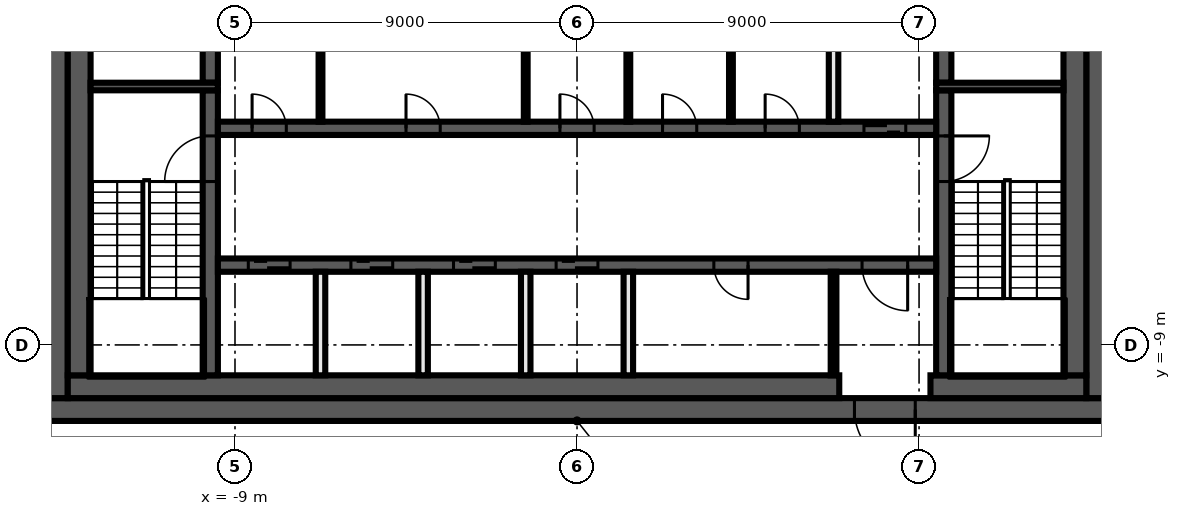
"""IFC4 building model, lengths in metres.
Left out: names, types, materials, properties, quantities, classifications, styles, units other than length and angle.
Written with IfcOpenShell. Run it as: python <this file> out.ifc"""

import sys

from ifc_helpers import new_model, si_unit, direction, frame, frame_2d, origin, place, context, subcontext, project, spatial, rectangle, extrude, element, fill, save


model = new_model("IFC4")
c1 = context("Model", 3, precision=1e-05, world=origin(), true_north=direction((0.0, 1.0)))
c2 = subcontext(c1, "Body", "Model", "MODEL_VIEW")
j1 = project(units=[si_unit("LENGTHUNIT", "METRE"), si_unit("PLANEANGLEUNIT", "RADIAN")], contexts=[c1])
p1 = place(None, origin())
s1 = spatial("IfcSite", under=j1, at=p1, CompositionType="ELEMENT")
p2 = place(p1, origin())
s2 = spatial("IfcBuilding", under=s1, at=p2, CompositionType="ELEMENT")
p3 = place(p2, frame((0.0, 0.0, 302.6)))
s3 = spatial("IfcBuildingStorey", under=s2, at=p3, CompositionType="ELEMENT", Elevation=302.6)
p4 = place(p3, frame((14.0, -10.7, 0.0), z_axis=(0.0, 0.0, 1.0), x_axis=(-1.0, 0.0, 0.0)))
e1 = element("IfcWall", 1, at=p4, inside=s3, PredefinedType="SHEAR", context=c2, shape_type="SweptSolid", body=[
    extrude(rectangle(XDim=28.0, YDim=0.6, at=frame_2d((14.0, 0.0))), origin(), (0.0, 0.0, 1.0), 3.82),
])
p5 = place(p4, frame((5.1, 0.0, 0.0)))
e2 = element("IfcOpeningElement", 2, at=p5, cuts=e1, PredefinedType="OPENING", context=c2, shape_type="SweptSolid", body=[
    extrude(rectangle(XDim=1.6, YDim=2.1, at=frame_2d((0.8, 1.05))), frame((0.0, 0.31, 0.0), z_axis=(0.0, -1.0, 0.0), x_axis=(1.0, 0.0, 0.0)), (0.0, 0.0, 1.0), 0.62),
])
for number, where, z_axis, x_axis in (
    (3, (13.7, 10.4, 0.0), (0.0, 0.0, 1.0), (0.0, -1.0, 0.0)),
    (4, (-13.7, -10.4, 0.0), (0.0, 0.0, 1.0), (0.0, 1.0, 0.0)),
):
    element("IfcWall", number, at=place(p3, frame(where, z_axis=z_axis, x_axis=x_axis)), inside=s3, PredefinedType="SHEAR", context=c2, shape_type="SweptSolid", body=[
        extrude(rectangle(XDim=20.8, YDim=0.6, at=frame_2d((10.4, 0.0))), origin(), (0.0, 0.0, 1.0), 3.82),
    ])
p6 = place(p3, frame((13.4, -10.1, 0.0), z_axis=(0.0, 0.0, 1.0), x_axis=(-1.0, 0.0, 0.0)))
e5 = element("IfcWall", 5, at=p6, inside=s3, PredefinedType="SHEAR", context=c2, shape_type="SweptSolid", body=[
    extrude(rectangle(XDim=4.1, YDim=0.6, at=frame_2d((2.05, 0.0))), origin(), (0.0, 0.0, 1.0), 3.82),
])
p7 = place(p3, frame((6.9, -10.1, 0.0), z_axis=(0.0, 0.0, 1.0), x_axis=(-1.0, 0.0, 0.0)))
e6 = element("IfcWall", 6, at=p7, inside=s3, PredefinedType="SHEAR", context=c2, shape_type="SweptSolid", body=[
    extrude(rectangle(XDim=20.3, YDim=0.6, at=frame_2d((10.15, 0.0))), origin(), (0.0, 0.0, 1.0), 3.82),
])
for number, where, z_axis, x_axis in (
    (7, (13.1, 9.8, 0.0), (0.0, 0.0, 1.0), (0.0, -1.0, 0.0)),
    (8, (-13.1, -9.8, 0.0), (0.0, 0.0, 1.0), (0.0, 1.0, 0.0)),
):
    element("IfcWall", number, at=place(p3, frame(where, z_axis=z_axis, x_axis=x_axis)), inside=s3, PredefinedType="SHEAR", context=c2, shape_type="SweptSolid", body=[
        extrude(rectangle(XDim=19.6, YDim=0.6, at=frame_2d((9.8, 0.0))), origin(), (0.0, 0.0, 1.0), 3.82),
    ])
p8 = place(p3, frame((9.65, -2.3, 0.0), z_axis=(0.0, 0.0, 1.0), x_axis=(0.0, -1.0, 0.0)))
e9 = element("IfcWall", 9, at=p8, inside=s3, PredefinedType="SHEAR", context=c2, shape_type="SweptSolid", body=[
    extrude(rectangle(XDim=7.5, YDim=0.4, at=frame_2d((3.75, 0.0))), origin(), (0.0, 0.0, 1.0), 3.82),
])
p9 = place(p8, frame((1.2, 0.0, 0.0)))
e10 = element("IfcOpeningElement", 10, at=p9, cuts=e9, PredefinedType="OPENING", context=c2, shape_type="SweptSolid", body=[
    extrude(rectangle(XDim=1.2, YDim=2.1, at=frame_2d((0.6, 1.05))), frame((0.0, 0.21, 0.0), z_axis=(0.0, -1.0, 0.0), x_axis=(1.0, 0.0, 0.0)), (0.0, 0.0, 1.0), 0.42),
])
p10 = place(p3, frame((9.65, 2.1, 0.0), z_axis=(0.0, 0.0, 1.0), x_axis=(0.0, -1.0, 0.0)))
e11 = element("IfcWall", 11, at=p10, inside=s3, PredefinedType="SHEAR", context=c2, shape_type="SweptSolid", body=[
    extrude(rectangle(XDim=4.2, YDim=0.4, at=frame_2d((2.1, 0.0))), origin(), (0.0, 0.0, 1.0), 3.82),
])
p11 = place(p10, frame((0.15, 0.0, 0.0)))
e12 = element("IfcOpeningElement", 12, at=p11, cuts=e11, PredefinedType="OPENING", context=c2, shape_type="SweptSolid", body=[
    extrude(rectangle(XDim=0.9, YDim=2.1, at=frame_2d((0.45, 1.05))), frame((0.0, 0.21, 0.0), z_axis=(0.0, -1.0, 0.0), x_axis=(1.0, 0.0, 0.0)), (0.0, 0.0, 1.0), 0.42),
])
p12 = place(p3, frame((-9.65, -9.8, 0.0), z_axis=(0.0, 0.0, 1.0), x_axis=(0.0, 1.0, 0.0)))
e13 = element("IfcWall", 13, at=p12, inside=s3, PredefinedType="SHEAR", context=c2, shape_type="SweptSolid", body=[
    extrude(rectangle(XDim=7.5, YDim=0.4, at=frame_2d((3.75, 0.0))), origin(), (0.0, 0.0, 1.0), 3.82),
])
p13 = place(p12, frame((5.1, 0.0, 0.0)))
e14 = element("IfcOpeningElement", 14, at=p13, cuts=e13, PredefinedType="OPENING", context=c2, shape_type="SweptSolid", body=[
    extrude(rectangle(XDim=1.2, YDim=2.1, at=frame_2d((0.6, 1.05))), frame((0.0, 0.21, 0.0), z_axis=(0.0, -1.0, 0.0), x_axis=(1.0, 0.0, 0.0)), (0.0, 0.0, 1.0), 0.42),
])
p14 = place(p3, frame((-9.65, -2.1, 0.0), z_axis=(0.0, 0.0, 1.0), x_axis=(0.0, 1.0, 0.0)))
e15 = element("IfcWall", 15, at=p14, inside=s3, PredefinedType="SHEAR", context=c2, shape_type="SweptSolid", body=[
    extrude(rectangle(XDim=4.2, YDim=0.4, at=frame_2d((2.1, 0.0))), origin(), (0.0, 0.0, 1.0), 3.82),
])
for number, where, z_axis, x_axis in (
    (16, (9.45, -2.2, 0.0), (0.0, 0.0, 1.0), (1.0, 0.0, 0.0)),
    (17, (-9.45, -2.2, 0.0), (0.0, 0.0, 1.0), (-1.0, 0.0, 0.0)),
):
    element("IfcWall", number, at=place(p3, frame(where, z_axis=z_axis, x_axis=x_axis)), inside=s3, PredefinedType="SHEAR", context=c2, shape_type="SweptSolid", body=[
        extrude(rectangle(XDim=3.35, YDim=0.2, at=frame_2d((1.675, 0.0))), origin(), (0.0, 0.0, 1.0), 3.82),
    ])
p15 = place(p3, frame((-9.45, -3.3, 0.0), z_axis=(0.0, 0.0, 1.0), x_axis=(1.0, 0.0, 0.0)))
e18 = element("IfcWall", 18, at=p15, inside=s3, PredefinedType="SHEAR", context=c2, shape_type="SweptSolid", body=[
    extrude(rectangle(XDim=18.9, YDim=0.35, at=frame_2d((9.45, 0.0))), origin(), (0.0, 0.0, 1.0), 3.82),
])
p16 = place(p15, frame((17.0, 0.0, 0.0)))
e19 = element("IfcOpeningElement", 19, at=p16, cuts=e18, PredefinedType="OPENING", context=c2, shape_type="SweptSolid", body=[
    extrude(rectangle(XDim=1.1, YDim=2.1, at=frame_2d((0.55, 1.05))), frame((0.0, 0.185, 0.0), z_axis=(0.0, -1.0, 0.0), x_axis=(1.0, 0.0, 0.0)), (0.0, 0.0, 1.0), 0.37),
])
p17 = place(p15, frame((0.9, 0.0, 0.0)))
e20 = element("IfcOpeningElement", 20, at=p17, cuts=e18, PredefinedType="OPENING", context=c2, shape_type="SweptSolid", body=[
    extrude(rectangle(XDim=0.9, YDim=2.1, at=frame_2d((0.45, 1.05))), frame((0.0, 0.185, 0.0), z_axis=(0.0, -1.0, 0.0), x_axis=(1.0, 0.0, 0.0)), (0.0, 0.0, 1.0), 0.37),
])
p18 = place(p15, frame((4.95, 0.0, 0.0)))
e21 = element("IfcOpeningElement", 21, at=p18, cuts=e18, PredefinedType="OPENING", context=c2, shape_type="SweptSolid", body=[
    extrude(rectangle(XDim=0.9, YDim=2.1, at=frame_2d((0.45, 1.05))), frame((0.0, 0.185, 0.0), z_axis=(0.0, -1.0, 0.0), x_axis=(1.0, 0.0, 0.0)), (0.0, 0.0, 1.0), 0.37),
])
p19 = place(p15, frame((9.0, 0.0, 0.0)))
e22 = element("IfcOpeningElement", 22, at=p19, cuts=e18, PredefinedType="OPENING", context=c2, shape_type="SweptSolid", body=[
    extrude(rectangle(XDim=0.9, YDim=2.1, at=frame_2d((0.45, 1.05))), frame((0.0, 0.185, 0.0), z_axis=(0.0, -1.0, 0.0), x_axis=(1.0, 0.0, 0.0)), (0.0, 0.0, 1.0), 0.37),
])
p20 = place(p15, frame((11.7, 0.0, 0.0)))
e23 = element("IfcOpeningElement", 23, at=p20, cuts=e18, PredefinedType="OPENING", context=c2, shape_type="SweptSolid", body=[
    extrude(rectangle(XDim=0.9, YDim=2.1, at=frame_2d((0.45, 1.05))), frame((0.0, 0.185, 0.0), z_axis=(0.0, -1.0, 0.0), x_axis=(1.0, 0.0, 0.0)), (0.0, 0.0, 1.0), 0.37),
])
p21 = place(p15, frame((14.4, 0.0, 0.0)))
e24 = element("IfcOpeningElement", 24, at=p21, cuts=e18, PredefinedType="OPENING", context=c2, shape_type="SweptSolid", body=[
    extrude(rectangle(XDim=0.9, YDim=2.1, at=frame_2d((0.45, 1.05))), frame((0.0, 0.185, 0.0), z_axis=(0.0, -1.0, 0.0), x_axis=(1.0, 0.0, 0.0)), (0.0, 0.0, 1.0), 0.37),
])
p22 = place(p3, frame((9.45, -6.9, 0.0), z_axis=(0.0, 0.0, 1.0), x_axis=(-1.0, 0.0, 0.0)))
e25 = element("IfcWall", 25, at=p22, inside=s3, PredefinedType="SHEAR", context=c2, shape_type="SweptSolid", body=[
    extrude(rectangle(XDim=18.9, YDim=0.35, at=frame_2d((9.45, 0.0))), origin(), (0.0, 0.0, 1.0), 3.82),
])
p23 = place(p22, frame((17.0, 0.0, 0.0)))
e26 = element("IfcOpeningElement", 26, at=p23, cuts=e25, PredefinedType="OPENING", context=c2, shape_type="SweptSolid", body=[
    extrude(rectangle(XDim=1.1, YDim=2.1, at=frame_2d((0.55, 1.05))), frame((0.0, 0.185, 0.0), z_axis=(0.0, -1.0, 0.0), x_axis=(1.0, 0.0, 0.0)), (0.0, 0.0, 1.0), 0.37),
])
p24 = place(p22, frame((14.3, 0.0, 0.0)))
e27 = element("IfcOpeningElement", 27, at=p24, cuts=e25, PredefinedType="OPENING", context=c2, shape_type="SweptSolid", body=[
    extrude(rectangle(XDim=1.1, YDim=2.1, at=frame_2d((0.55, 1.05))), frame((0.0, 0.185, 0.0), z_axis=(0.0, -1.0, 0.0), x_axis=(1.0, 0.0, 0.0)), (0.0, 0.0, 1.0), 0.37),
])
p25 = place(p22, frame((11.6, 0.0, 0.0)))
e28 = element("IfcOpeningElement", 28, at=p25, cuts=e25, PredefinedType="OPENING", context=c2, shape_type="SweptSolid", body=[
    extrude(rectangle(XDim=1.1, YDim=2.1, at=frame_2d((0.55, 1.05))), frame((0.0, 0.185, 0.0), z_axis=(0.0, -1.0, 0.0), x_axis=(1.0, 0.0, 0.0)), (0.0, 0.0, 1.0), 0.37),
])
p26 = place(p22, frame((8.9, 0.0, 0.0)))
e29 = element("IfcOpeningElement", 29, at=p26, cuts=e25, PredefinedType="OPENING", context=c2, shape_type="SweptSolid", body=[
    extrude(rectangle(XDim=1.1, YDim=2.1, at=frame_2d((0.55, 1.05))), frame((0.0, 0.185, 0.0), z_axis=(0.0, -1.0, 0.0), x_axis=(1.0, 0.0, 0.0)), (0.0, 0.0, 1.0), 0.37),
])
p27 = place(p22, frame((0.75, 0.0, 0.0)))
e30 = element("IfcOpeningElement", 30, at=p27, cuts=e25, PredefinedType="OPENING", context=c2, shape_type="SweptSolid", body=[
    extrude(rectangle(XDim=1.2, YDim=2.1, at=frame_2d((0.6, 1.05))), frame((0.0, 0.185, 0.0), z_axis=(0.0, -1.0, 0.0), x_axis=(1.0, 0.0, 0.0)), (0.0, 0.0, 1.0), 0.37),
])
p28 = place(p22, frame((4.95, 0.0, 0.0)))
e31 = element("IfcOpeningElement", 31, at=p28, cuts=e25, PredefinedType="OPENING", context=c2, shape_type="SweptSolid", body=[
    extrude(rectangle(XDim=0.9, YDim=2.1, at=frame_2d((0.45, 1.05))), frame((0.0, 0.185, 0.0), z_axis=(0.0, -1.0, 0.0), x_axis=(1.0, 0.0, 0.0)), (0.0, 0.0, 1.0), 0.37),
])
p29 = place(p3, frame((6.75, -9.8, 0.0), z_axis=(0.0, 0.0, 1.0), x_axis=(0.0, 1.0, 0.0)))
e32 = element("IfcWall", 32, at=p29, inside=s3, PredefinedType="PARTITIONING", context=c2, shape_type="SweptSolid", body=[
    extrude(rectangle(XDim=2.725, YDim=0.15, at=frame_2d((1.363, 0.0))), origin(), (0.0, 0.0, 1.0), 3.82),
])
p30 = place(p3, frame((6.75, -3.125, 0.0), z_axis=(0.0, 0.0, 1.0), x_axis=(0.0, 1.0, 0.0)))
e33 = element("IfcWall", 33, at=p30, inside=s3, PredefinedType="SOLIDWALL", context=c2, shape_type="SweptSolid", body=[
    extrude(rectangle(XDim=2.725, YDim=0.25, at=frame_2d((1.363, 0.0))), origin(), (0.0, 0.0, 1.0), 3.82),
])
for number, where, z_axis, x_axis in (
    (34, (4.05, -3.125, 0.0), (0.0, 0.0, 1.0), (0.0, 1.0, 0.0)),
    (35, (1.35, -3.125, 0.0), (0.0, 0.0, 1.0), (0.0, 1.0, 0.0)),
):
    element("IfcWall", number, at=place(p3, frame(where, z_axis=z_axis, x_axis=x_axis)), inside=s3, PredefinedType="PARTITIONING", context=c2, shape_type="SweptSolid", body=[
        extrude(rectangle(XDim=2.725, YDim=0.1, at=frame_2d((1.363, 0.0))), origin(), (0.0, 0.0, 1.0), 3.82),
    ])
p31 = place(p3, frame((1.35, -9.8, 0.0), z_axis=(0.0, 0.0, 1.0), x_axis=(0.0, 1.0, 0.0)))
e36 = element("IfcWall", 36, at=p31, inside=s3, PredefinedType="SOLIDWALL", context=c2, shape_type="SweptSolid", body=[
    extrude(rectangle(XDim=2.725, YDim=0.25, at=frame_2d((1.363, 0.0))), origin(), (0.0, 0.0, 1.0), 3.82),
])
p32 = place(p3, frame((-1.35, -3.125, 0.0), z_axis=(0.0, 0.0, 1.0), x_axis=(0.0, 1.0, 0.0)))
e37 = element("IfcWall", 37, at=p32, inside=s3, PredefinedType="PARTITIONING", context=c2, shape_type="SweptSolid", body=[
    extrude(rectangle(XDim=2.725, YDim=0.1, at=frame_2d((1.363, 0.0))), origin(), (0.0, 0.0, 1.0), 3.82),
])
for number, where, z_axis, x_axis in (
    (38, (-1.35, -9.8, 0.0), (0.0, 0.0, 1.0), (0.0, 1.0, 0.0)),
    (39, (-4.05, -9.8, 0.0), (0.0, 0.0, 1.0), (0.0, 1.0, 0.0)),
):
    element("IfcWall", number, at=place(p3, frame(where, z_axis=z_axis, x_axis=x_axis)), inside=s3, PredefinedType="SOLIDWALL", context=c2, shape_type="SweptSolid", body=[
        extrude(rectangle(XDim=2.725, YDim=0.25, at=frame_2d((1.363, 0.0))), origin(), (0.0, 0.0, 1.0), 3.82),
    ])
p33 = place(p3, frame((-6.75, -3.125, 0.0), z_axis=(0.0, 0.0, 1.0), x_axis=(0.0, 1.0, 0.0)))
e40 = element("IfcWall", 40, at=p33, inside=s3, PredefinedType="PARTITIONING", context=c2, shape_type="SweptSolid", body=[
    extrude(rectangle(XDim=2.725, YDim=0.1, at=frame_2d((1.363, 0.0))), origin(), (0.0, 0.0, 1.0), 3.82),
])
p34 = place(p3, frame((-6.75, -9.8, 0.0), z_axis=(0.0, 0.0, 1.0), x_axis=(0.0, 1.0, 0.0)))
e41 = element("IfcWall", 41, at=p34, inside=s3, PredefinedType="SOLIDWALL", context=c2, shape_type="SweptSolid", body=[
    extrude(rectangle(XDim=2.725, YDim=0.25, at=frame_2d((1.363, 0.0))), origin(), (0.0, 0.0, 1.0), 3.82),
])
p35 = place(p16, origin())
e42 = element("IfcDoor", 42, at=p35, inside=s3, OperationType="DOUBLE_DOOR_SLIDING", PredefinedType="DOOR", context=c2, shape_type="SweptSolid", body=[
    extrude(rectangle(XDim=1.1, YDim=2.1, at=frame_2d((0.55, 1.05))), frame((0.0, 0.025, 0.0), z_axis=(0.0, -1.0, 0.0), x_axis=(1.0, 0.0, 0.0)), (0.0, 0.0, 1.0), 0.05),
])
fill(e19, e42)
p36 = place(p23, origin())
e43 = element("IfcDoor", 43, at=p36, inside=s3, OperationType="DOUBLE_DOOR_SLIDING", PredefinedType="DOOR", context=c2, shape_type="SweptSolid", body=[
    extrude(rectangle(XDim=1.1, YDim=2.1, at=frame_2d((0.55, 1.05))), frame((0.0, 0.025, 0.0), z_axis=(0.0, -1.0, 0.0), x_axis=(1.0, 0.0, 0.0)), (0.0, 0.0, 1.0), 0.05),
])
fill(e26, e43)
p37 = place(p24, origin())
e44 = element("IfcDoor", 44, at=p37, inside=s3, OperationType="DOUBLE_DOOR_SLIDING", PredefinedType="DOOR", context=c2, shape_type="SweptSolid", body=[
    extrude(rectangle(XDim=1.1, YDim=2.1, at=frame_2d((0.55, 1.05))), frame((0.0, 0.025, 0.0), z_axis=(0.0, -1.0, 0.0), x_axis=(1.0, 0.0, 0.0)), (0.0, 0.0, 1.0), 0.05),
])
fill(e27, e44)
p38 = place(p25, origin())
e45 = element("IfcDoor", 45, at=p38, inside=s3, OperationType="DOUBLE_DOOR_SLIDING", PredefinedType="DOOR", context=c2, shape_type="SweptSolid", body=[
    extrude(rectangle(XDim=1.1, YDim=2.1, at=frame_2d((0.55, 1.05))), frame((0.0, 0.025, 0.0), z_axis=(0.0, -1.0, 0.0), x_axis=(1.0, 0.0, 0.0)), (0.0, 0.0, 1.0), 0.05),
])
fill(e28, e45)
p39 = place(p26, origin())
e46 = element("IfcDoor", 46, at=p39, inside=s3, OperationType="DOUBLE_DOOR_SLIDING", PredefinedType="DOOR", context=c2, shape_type="SweptSolid", body=[
    extrude(rectangle(XDim=1.1, YDim=2.1, at=frame_2d((0.55, 1.05))), frame((0.0, 0.025, 0.0), z_axis=(0.0, -1.0, 0.0), x_axis=(1.0, 0.0, 0.0)), (0.0, 0.0, 1.0), 0.05),
])
fill(e29, e46)
p40 = place(p5, origin())
e47 = element("IfcDoor", 47, at=p40, inside=s3, OperationType="DOUBLE_DOOR_SINGLE_SWING", PredefinedType="DOOR", context=c2, shape_type="SweptSolid", body=[
    extrude(rectangle(XDim=1.6, YDim=2.1, at=frame_2d((0.8, 1.05))), frame((0.0, 0.025, 0.0), z_axis=(0.0, -1.0, 0.0), x_axis=(1.0, 0.0, 0.0)), (0.0, 0.0, 1.0), 0.05),
])
fill(e2, e47)
p41 = place(p27, origin())
e48 = element("IfcDoor", 48, at=p41, inside=s3, OperationType="SINGLE_SWING_LEFT", PredefinedType="DOOR", context=c2, shape_type="SweptSolid", body=[
    extrude(rectangle(XDim=1.2, YDim=2.1, at=frame_2d((0.6, 1.05))), frame((0.0, 0.025, 0.0), z_axis=(0.0, -1.0, 0.0), x_axis=(1.0, 0.0, 0.0)), (0.0, 0.0, 1.0), 0.05),
])
fill(e30, e48)
p42 = place(p17, origin())
e49 = element("IfcDoor", 49, at=p42, inside=s3, OperationType="SINGLE_SWING_LEFT", PredefinedType="DOOR", context=c2, shape_type="SweptSolid", body=[
    extrude(rectangle(XDim=0.9, YDim=2.1, at=frame_2d((0.45, 1.05))), frame((0.0, 0.025, 0.0), z_axis=(0.0, -1.0, 0.0), x_axis=(1.0, 0.0, 0.0)), (0.0, 0.0, 1.0), 0.05),
])
fill(e20, e49)
p43 = place(p18, origin())
e50 = element("IfcDoor", 50, at=p43, inside=s3, OperationType="SINGLE_SWING_RIGHT", PredefinedType="DOOR", context=c2, shape_type="SweptSolid", body=[
    extrude(rectangle(XDim=0.9, YDim=2.1, at=frame_2d((0.45, 1.05))), frame((0.0, 0.025, 0.0), z_axis=(0.0, -1.0, 0.0), x_axis=(1.0, 0.0, 0.0)), (0.0, 0.0, 1.0), 0.05),
])
fill(e21, e50)
p44 = place(p19, origin())
e51 = element("IfcDoor", 51, at=p44, inside=s3, OperationType="SINGLE_SWING_LEFT", PredefinedType="DOOR", context=c2, shape_type="SweptSolid", body=[
    extrude(rectangle(XDim=0.9, YDim=2.1, at=frame_2d((0.45, 1.05))), frame((0.0, 0.025, 0.0), z_axis=(0.0, -1.0, 0.0), x_axis=(1.0, 0.0, 0.0)), (0.0, 0.0, 1.0), 0.05),
])
fill(e22, e51)
p45 = place(p20, origin())
e52 = element("IfcDoor", 52, at=p45, inside=s3, OperationType="SINGLE_SWING_RIGHT", PredefinedType="DOOR", context=c2, shape_type="SweptSolid", body=[
    extrude(rectangle(XDim=0.9, YDim=2.1, at=frame_2d((0.45, 1.05))), frame((0.0, 0.025, 0.0), z_axis=(0.0, -1.0, 0.0), x_axis=(1.0, 0.0, 0.0)), (0.0, 0.0, 1.0), 0.05),
])
fill(e23, e52)
p46 = place(p21, origin())
e53 = element("IfcDoor", 53, at=p46, inside=s3, OperationType="SINGLE_SWING_LEFT", PredefinedType="DOOR", context=c2, shape_type="SweptSolid", body=[
    extrude(rectangle(XDim=0.9, YDim=2.1, at=frame_2d((0.45, 1.05))), frame((0.0, 0.025, 0.0), z_axis=(0.0, -1.0, 0.0), x_axis=(1.0, 0.0, 0.0)), (0.0, 0.0, 1.0), 0.05),
])
fill(e24, e53)
p47 = place(p28, origin())
e54 = element("IfcDoor", 54, at=p47, inside=s3, OperationType="SINGLE_SWING_RIGHT", PredefinedType="DOOR", context=c2, shape_type="SweptSolid", body=[
    extrude(rectangle(XDim=0.9, YDim=2.1, at=frame_2d((0.45, 1.05))), frame((0.0, 0.025, 0.0), z_axis=(0.0, -1.0, 0.0), x_axis=(1.0, 0.0, 0.0)), (0.0, 0.0, 1.0), 0.05),
])
fill(e31, e54)
p48 = place(p9, origin())
e55 = element("IfcDoor", 55, at=p48, inside=s3, OperationType="SINGLE_SWING_RIGHT", PredefinedType="DOOR", context=c2, shape_type="SweptSolid", body=[
    extrude(rectangle(XDim=1.2, YDim=2.1, at=frame_2d((0.6, 1.05))), frame((0.0, 0.025, 0.0), z_axis=(0.0, -1.0, 0.0), x_axis=(1.0, 0.0, 0.0)), (0.0, 0.0, 1.0), 0.05),
])
fill(e10, e55)
p49 = place(p13, origin())
e56 = element("IfcDoor", 56, at=p49, inside=s3, OperationType="SINGLE_SWING_LEFT", PredefinedType="DOOR", context=c2, shape_type="SweptSolid", body=[
    extrude(rectangle(XDim=1.2, YDim=2.1, at=frame_2d((0.6, 1.05))), frame((0.0, 0.025, 0.0), z_axis=(0.0, -1.0, 0.0), x_axis=(1.0, 0.0, 0.0)), (0.0, 0.0, 1.0), 0.05),
])
fill(e14, e56)
save(model, sys.argv[1])
